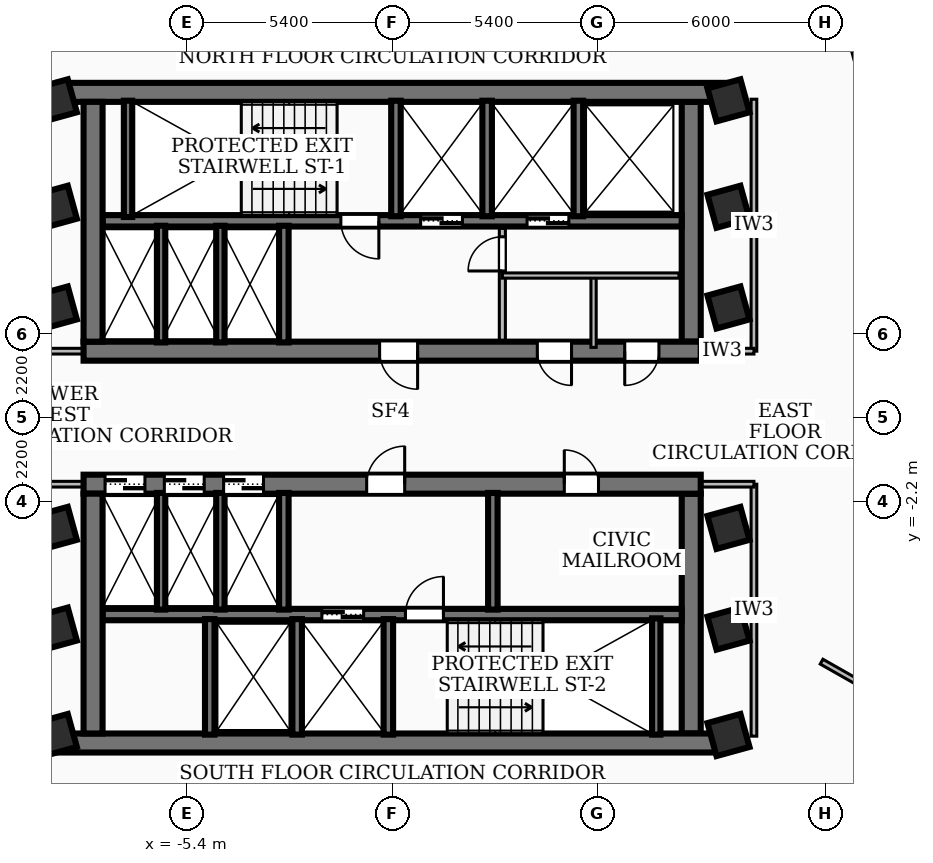
"""IFC4 building model, lengths in metres.
Left out: names, types, materials, properties, quantities, classifications, styles, units other than length and angle.
Written with IfcOpenShell. Run it as: python <this file> out.ifc"""

import sys

from ifc_helpers import new_model, si_unit, direction, frame, frame_2d, origin, origin_2d, place, context, subcontext, project, spatial, rectangle, extrude, element, fill, save


model = new_model("IFC4")
c1 = context("Model", 3, precision=1e-05, world=origin(), true_north=direction((0.0, 1.0)))
c2 = subcontext(c1, "Body", "Model", "MODEL_VIEW")
j1 = project(units=[si_unit("LENGTHUNIT", "METRE"), si_unit("PLANEANGLEUNIT", "RADIAN")], contexts=[c1])
p1 = place(None, origin())
s1 = spatial("IfcSite", under=j1, at=p1, CompositionType="ELEMENT")
p2 = place(p1, origin())
s2 = spatial("IfcBuilding", under=s1, at=p2, CompositionType="ELEMENT")
p3 = place(p2, frame((0.0, 0.0, 137.88)))
s3 = spatial("IfcBuildingStorey", under=s2, at=p3, CompositionType="ELEMENT", Elevation=137.88)
p4 = place(p3, frame((-8.78, 8.56, 0.0), z_axis=(0.0, 0.0, 1.0), x_axis=(1.0, 0.0, 0.0)))
e1 = element("IfcWall", 1, at=p4, inside=s3, PredefinedType="SHEAR", context=c2, shape_type="SweptSolid", body=[
    extrude(rectangle(XDim=17.56, YDim=0.5, at=frame_2d((8.78, 0.0))), origin(), (0.0, 0.0, 1.0), 3.32),
])
p5 = place(p3, frame((8.12, 1.75, 0.0), z_axis=(0.0, 0.0, 1.0), x_axis=(-1.0, 0.0, 0.0)))
e2 = element("IfcWall", 2, at=p5, inside=s3, PredefinedType="SHEAR", context=c2, shape_type="SweptSolid", body=[
    extrude(rectangle(XDim=16.24, YDim=0.5, at=frame_2d((8.12, 0.0))), origin(), (0.0, 0.0, 1.0), 3.32),
])
p6 = place(p5, frame((7.45, 0.0, 0.0)))
e3 = element("IfcOpeningElement", 3, at=p6, cuts=e2, PredefinedType="OPENING", context=c2, shape_type="SweptSolid", body=[
    extrude(rectangle(XDim=1.0, YDim=2.1, at=frame_2d((0.5, 1.05))), frame((0.0, 0.26, 0.0), z_axis=(0.0, -1.0, 0.0), x_axis=(1.0, 0.0, 0.0)), (0.0, 0.0, 1.0), 0.52),
])
p7 = place(p5, frame((3.4, 0.0, 0.0)))
e4 = element("IfcOpeningElement", 4, at=p7, cuts=e2, PredefinedType="OPENING", context=c2, shape_type="SweptSolid", body=[
    extrude(rectangle(XDim=0.9, YDim=2.06, at=frame_2d((0.45, 1.03))), frame((0.0, 0.26, 0.0), z_axis=(0.0, -1.0, 0.0), x_axis=(1.0, 0.0, 0.0)), (0.0, 0.0, 1.0), 0.52),
])
p8 = place(p5, frame((1.1, 0.0, 0.0)))
e5 = element("IfcOpeningElement", 5, at=p8, cuts=e2, PredefinedType="OPENING", context=c2, shape_type="SweptSolid", body=[
    extrude(rectangle(XDim=0.9, YDim=2.06, at=frame_2d((0.45, 1.03))), frame((0.0, 0.26, 0.0), z_axis=(0.0, -1.0, 0.0), x_axis=(1.0, 0.0, 0.0)), (0.0, 0.0, 1.0), 0.52),
])
for number, where, z_axis, x_axis in (
    (6, (-7.87, 2.0, 0.0), (0.0, 0.0, 1.0), (0.0, 1.0, 0.0)),
    (7, (7.87, 8.31, 0.0), (0.0, 0.0, 1.0), (0.0, -1.0, 0.0)),
):
    element("IfcWall", number, at=place(p3, frame(where, z_axis=z_axis, x_axis=x_axis)), inside=s3, PredefinedType="SHEAR", context=c2, shape_type="SweptSolid", body=[
        extrude(rectangle(XDim=6.31, YDim=0.5, at=frame_2d((3.155, 0.0))), origin(), (0.0, 0.0, 1.0), 3.32),
    ])
p9 = place(p3, frame((7.62, 5.18, 0.0), z_axis=(0.0, 0.0, 1.0), x_axis=(-1.0, 0.0, 0.0)))
e8 = element("IfcWall", 8, at=p9, inside=s3, PredefinedType="SOLIDWALL", context=c2, shape_type="SweptSolid", body=[
    extrude(rectangle(XDim=15.24, YDim=0.3, at=frame_2d((7.62, 0.0))), origin(), (0.0, 0.0, 1.0), 3.32),
])
p10 = place(p9, frame((5.77, 0.0, 0.0)))
e9 = element("IfcOpeningElement", 9, at=p10, cuts=e8, PredefinedType="OPENING", context=c2, shape_type="SweptSolid", body=[
    extrude(rectangle(XDim=1.1, YDim=2.15, at=frame_2d((0.55, 1.075))), frame((0.0, 0.16, 0.0), z_axis=(0.0, -1.0, 0.0), x_axis=(1.0, 0.0, 0.0)), (0.0, 0.0, 1.0), 0.32),
])
p11 = place(p9, frame((2.97, 0.0, 0.0)))
e10 = element("IfcOpeningElement", 10, at=p11, cuts=e8, PredefinedType="OPENING", context=c2, shape_type="SweptSolid", body=[
    extrude(rectangle(XDim=1.1, YDim=2.15, at=frame_2d((0.55, 1.075))), frame((0.0, 0.16, 0.0), z_axis=(0.0, -1.0, 0.0), x_axis=(1.0, 0.0, 0.0)), (0.0, 0.0, 1.0), 0.32),
])
p12 = place(p9, frame((7.97, 0.0, 0.0)))
e11 = element("IfcOpeningElement", 11, at=p12, cuts=e8, PredefinedType="OPENING", context=c2, shape_type="SweptSolid", body=[
    extrude(rectangle(XDim=1.0, YDim=2.1, at=frame_2d((0.5, 1.05))), frame((0.0, 0.16, 0.0), z_axis=(0.0, -1.0, 0.0), x_axis=(1.0, 0.0, 0.0)), (0.0, 0.0, 1.0), 0.32),
])
p13 = place(p3, frame((8.78, -8.56, 0.0), z_axis=(0.0, 0.0, 1.0), x_axis=(-1.0, 0.0, 0.0)))
e12 = element("IfcWall", 12, at=p13, inside=s3, PredefinedType="SHEAR", context=c2, shape_type="SweptSolid", body=[
    extrude(rectangle(XDim=17.56, YDim=0.5, at=frame_2d((8.78, 0.0))), origin(), (0.0, 0.0, 1.0), 3.32),
])
p14 = place(p3, frame((-8.12, -1.75, 0.0), z_axis=(0.0, 0.0, 1.0), x_axis=(1.0, 0.0, 0.0)))
e13 = element("IfcWall", 13, at=p14, inside=s3, PredefinedType="SHEAR", context=c2, shape_type="SweptSolid", body=[
    extrude(rectangle(XDim=16.24, YDim=0.5, at=frame_2d((8.12, 0.0))), origin(), (0.0, 0.0, 1.0), 3.32),
])
p15 = place(p14, frame((7.45, 0.0, 0.0)))
e14 = element("IfcOpeningElement", 14, at=p15, cuts=e13, PredefinedType="OPENING", context=c2, shape_type="SweptSolid", body=[
    extrude(rectangle(XDim=1.0, YDim=2.1, at=frame_2d((0.5, 1.05))), frame((0.0, 0.26, 0.0), z_axis=(0.0, -1.0, 0.0), x_axis=(1.0, 0.0, 0.0)), (0.0, 0.0, 1.0), 0.52),
])
p16 = place(p14, frame((12.65, 0.0, 0.0)))
e15 = element("IfcOpeningElement", 15, at=p16, cuts=e13, PredefinedType="OPENING", context=c2, shape_type="SweptSolid", body=[
    extrude(rectangle(XDim=0.9, YDim=2.06, at=frame_2d((0.45, 1.03))), frame((0.0, 0.26, 0.0), z_axis=(0.0, -1.0, 0.0), x_axis=(1.0, 0.0, 0.0)), (0.0, 0.0, 1.0), 0.52),
])
p17 = place(p14, frame((0.565, 0.0, 0.0)))
e16 = element("IfcOpeningElement", 16, at=p17, cuts=e13, PredefinedType="OPENING", context=c2, shape_type="SweptSolid", body=[
    extrude(rectangle(XDim=1.05, YDim=2.15, at=frame_2d((0.525, 1.075))), frame((0.0, 0.26, 0.0), z_axis=(0.0, -1.0, 0.0), x_axis=(1.0, 0.0, 0.0)), (0.0, 0.0, 1.0), 0.52),
])
p18 = place(p14, frame((2.125, 0.0, 0.0)))
e17 = element("IfcOpeningElement", 17, at=p18, cuts=e13, PredefinedType="OPENING", context=c2, shape_type="SweptSolid", body=[
    extrude(rectangle(XDim=1.05, YDim=2.15, at=frame_2d((0.525, 1.075))), frame((0.0, 0.26, 0.0), z_axis=(0.0, -1.0, 0.0), x_axis=(1.0, 0.0, 0.0)), (0.0, 0.0, 1.0), 0.52),
])
p19 = place(p14, frame((3.685, 0.0, 0.0)))
e18 = element("IfcOpeningElement", 18, at=p19, cuts=e13, PredefinedType="OPENING", context=c2, shape_type="SweptSolid", body=[
    extrude(rectangle(XDim=1.05, YDim=2.15, at=frame_2d((0.525, 1.075))), frame((0.0, 0.26, 0.0), z_axis=(0.0, -1.0, 0.0), x_axis=(1.0, 0.0, 0.0)), (0.0, 0.0, 1.0), 0.52),
])
for number, where, z_axis, x_axis in (
    (19, (-7.87, -8.31, 0.0), (0.0, 0.0, 1.0), (0.0, 1.0, 0.0)),
    (20, (7.87, -2.0, 0.0), (0.0, 0.0, 1.0), (0.0, -1.0, 0.0)),
):
    element("IfcWall", number, at=place(p3, frame(where, z_axis=z_axis, x_axis=x_axis)), inside=s3, PredefinedType="SHEAR", context=c2, shape_type="SweptSolid", body=[
        extrude(rectangle(XDim=6.31, YDim=0.5, at=frame_2d((3.155, 0.0))), origin(), (0.0, 0.0, 1.0), 3.32),
    ])
p20 = place(p3, frame((-7.62, -5.18, 0.0), z_axis=(0.0, 0.0, 1.0), x_axis=(1.0, 0.0, 0.0)))
e21 = element("IfcWall", 21, at=p20, inside=s3, PredefinedType="SOLIDWALL", context=c2, shape_type="SweptSolid", body=[
    extrude(rectangle(XDim=15.24, YDim=0.3, at=frame_2d((7.62, 0.0))), origin(), (0.0, 0.0, 1.0), 3.32),
])
p21 = place(p20, frame((5.77, 0.0, 0.0)))
e22 = element("IfcOpeningElement", 22, at=p21, cuts=e21, PredefinedType="OPENING", context=c2, shape_type="SweptSolid", body=[
    extrude(rectangle(XDim=1.1, YDim=2.15, at=frame_2d((0.55, 1.075))), frame((0.0, 0.16, 0.0), z_axis=(0.0, -1.0, 0.0), x_axis=(1.0, 0.0, 0.0)), (0.0, 0.0, 1.0), 0.32),
])
p22 = place(p20, frame((7.97, 0.0, 0.0)))
e23 = element("IfcOpeningElement", 23, at=p22, cuts=e21, PredefinedType="OPENING", context=c2, shape_type="SweptSolid", body=[
    extrude(rectangle(XDim=1.0, YDim=2.1, at=frame_2d((0.5, 1.05))), frame((0.0, 0.16, 0.0), z_axis=(0.0, -1.0, 0.0), x_axis=(1.0, 0.0, 0.0)), (0.0, 0.0, 1.0), 0.32),
])
for number, where, z_axis, x_axis in (
    (24, (-6.95, 5.28, 0.0), (0.0, 0.0, 1.0), (0.0, 1.0, 0.0)),
    (25, (6.95, -8.34, 0.0), (0.0, 0.0, 1.0), (0.0, 1.0, 0.0)),
):
    element("IfcWall", number, at=place(p3, frame(where, z_axis=z_axis, x_axis=x_axis)), inside=s3, PredefinedType="SOLIDWALL", context=c2, shape_type="SweptSolid", body=[
        extrude(rectangle(XDim=3.06, YDim=0.22, at=frame_2d((1.53, 0.0))), origin(), (0.0, 0.0, 1.0), 3.32),
    ])
for number, where, z_axis, x_axis in (
    (26, (0.1, 5.3, 0.0), (0.0, 0.0, 1.0), (0.0, 1.0, 0.0)),
    (27, (2.5, 5.3, 0.0), (0.0, 0.0, 1.0), (0.0, 1.0, 0.0)),
    (28, (4.9, 5.3, 0.0), (0.0, 0.0, 1.0), (0.0, 1.0, 0.0)),
):
    element("IfcWall", number, at=place(p3, frame(where, z_axis=z_axis, x_axis=x_axis)), inside=s3, PredefinedType="SOLIDWALL", context=c2, shape_type="SweptSolid", body=[
        extrude(rectangle(XDim=3.04, YDim=0.25, at=frame_2d((1.52, 0.0))), origin(), (0.0, 0.0, 1.0), 3.32),
    ])
p23 = place(p3, frame((-2.85, 1.98, 0.0), z_axis=(0.0, 0.0, 1.0), x_axis=(0.0, 1.0, 0.0)))
e29 = element("IfcWall", 29, at=p23, inside=s3, PredefinedType="SOLIDWALL", context=c2, shape_type="SweptSolid", body=[
    extrude(rectangle(XDim=3.07, YDim=0.25, at=frame_2d((1.535, 0.0))), origin(), (0.0, 0.0, 1.0), 3.32),
])
for number, where, z_axis, x_axis in (
    (30, (-0.1, -8.34, 0.0), (0.0, 0.0, 1.0), (0.0, 1.0, 0.0)),
    (31, (-2.5, -8.34, 0.0), (0.0, 0.0, 1.0), (0.0, 1.0, 0.0)),
    (32, (-4.8, -8.34, 0.0), (0.0, 0.0, 1.0), (0.0, 1.0, 0.0)),
):
    element("IfcWall", number, at=place(p3, frame(where, z_axis=z_axis, x_axis=x_axis)), inside=s3, PredefinedType="SOLIDWALL", context=c2, shape_type="SweptSolid", body=[
        extrude(rectangle(XDim=3.04, YDim=0.25, at=frame_2d((1.52, 0.0))), origin(), (0.0, 0.0, 1.0), 3.32),
    ])
for number, where, z_axis, x_axis in (
    (33, (-2.85, -5.05, 0.0), (0.0, 0.0, 1.0), (0.0, 1.0, 0.0)),
    (34, (2.65, -5.05, 0.0), (0.0, 0.0, 1.0), (0.0, 1.0, 0.0)),
):
    element("IfcWall", number, at=place(p3, frame(where, z_axis=z_axis, x_axis=x_axis)), inside=s3, PredefinedType="SOLIDWALL", context=c2, shape_type="SweptSolid", body=[
        extrude(rectangle(XDim=3.07, YDim=0.25, at=frame_2d((1.535, 0.0))), origin(), (0.0, 0.0, 1.0), 3.32),
    ])
for number, where, z_axis, x_axis in (
    (35, (-6.08, 1.98, 0.0), (0.0, 0.0, 1.0), (0.0, 1.0, 0.0)),
    (36, (-4.52, 1.98, 0.0), (0.0, 0.0, 1.0), (0.0, 1.0, 0.0)),
    (37, (-6.08, -5.05, 0.0), (0.0, 0.0, 1.0), (0.0, 1.0, 0.0)),
    (38, (-4.52, -5.05, 0.0), (0.0, 0.0, 1.0), (0.0, 1.0, 0.0)),
):
    element("IfcWall", number, at=place(p3, frame(where, z_axis=z_axis, x_axis=x_axis)), inside=s3, PredefinedType="SOLIDWALL", context=c2, shape_type="SweptSolid", body=[
        extrude(rectangle(XDim=3.07, YDim=0.22, at=frame_2d((1.535, 0.0))), origin(), (0.0, 0.0, 1.0), 3.32),
    ])
for number, where, z_axis, x_axis in (
    (39, (-8.85, -5.55, 0.0), (0.0, 0.0, 1.0), (0.964, 0.266, 0.0)),
    (40, (-8.85, -2.9, 0.0), (0.0, 0.0, 1.0), (0.964, 0.266, 0.0)),
    (41, (-8.85, 2.9, 0.0), (0.0, 0.0, 1.0), (0.964, 0.266, 0.0)),
    (42, (-8.85, 5.55, 0.0), (0.0, 0.0, 1.0), (0.964, 0.266, 0.0)),
    (43, (8.85, -5.55, 0.0), (0.0, 0.0, 1.0), (0.964, 0.266, 0.0)),
    (44, (8.85, -2.9, 0.0), (0.0, 0.0, 1.0), (0.964, 0.266, 0.0)),
    (45, (8.85, 2.9, 0.0), (0.0, 0.0, 1.0), (0.964, 0.266, 0.0)),
    (46, (8.85, 5.55, 0.0), (0.0, 0.0, 1.0), (0.964, 0.266, 0.0)),
    (47, (-8.85, 8.35, 0.0), (0.0, 0.0, 1.0), (0.964, 0.266, 0.0)),
    (48, (8.85, -8.35, 0.0), (0.0, 0.0, 1.0), (0.964, 0.266, 0.0)),
    (49, (8.85, 8.35, 0.0), (0.0, 0.0, 1.0), (0.964, 0.266, 0.0)),
    (50, (-8.85, -8.35, 0.0), (0.0, 0.0, 1.0), (0.964, 0.266, 0.0)),
):
    element("IfcColumn", number, at=place(p3, frame(where, z_axis=z_axis, x_axis=x_axis)), inside=s3, PredefinedType="COLUMN", context=c2, shape_type="SweptSolid", body=[
        extrude(rectangle(XDim=0.9, YDim=0.9, at=origin_2d()), origin(), (0.0, 0.0, 1.0), 3.6),
    ])
p24 = place(p3, frame((2.9, 2.04, 0.0), z_axis=(0.0, 0.0, 1.0), x_axis=(0.0, 1.0, 0.0)))
e51 = element("IfcWall", 51, at=p24, inside=s3, PredefinedType="PARTITIONING", context=c2, shape_type="SweptSolid", body=[
    extrude(rectangle(XDim=2.94, YDim=0.16, at=frame_2d((1.47, 0.0))), origin(), (0.0, 0.0, 1.0), 2.55),
])
p25 = place(p24, frame((1.82, 0.0, 0.0)))
e52 = element("IfcOpeningElement", 52, at=p25, cuts=e51, PredefinedType="OPENING", context=c2, shape_type="SweptSolid", body=[
    extrude(rectangle(XDim=0.9, YDim=2.06, at=frame_2d((0.45, 1.03))), frame((0.0, 0.09, 0.0), z_axis=(0.0, -1.0, 0.0), x_axis=(1.0, 0.0, 0.0)), (0.0, 0.0, 1.0), 0.18),
])
p26 = place(p3, frame((2.9, 3.74, 0.0), z_axis=(0.0, 0.0, 1.0), x_axis=(1.0, 0.0, 0.0)))
e53 = element("IfcWall", 53, at=p26, inside=s3, PredefinedType="PARTITIONING", context=c2, shape_type="SweptSolid", body=[
    extrude(rectangle(XDim=4.65, YDim=0.138, at=frame_2d((2.325, 0.0))), origin(), (0.0, 0.0, 1.0), 3.32),
])
p27 = place(p3, frame((5.3, 1.85, 0.0), z_axis=(0.0, 0.0, 1.0), x_axis=(0.0, 1.0, 0.0)))
e54 = element("IfcWall", 54, at=p27, inside=s3, PredefinedType="PARTITIONING", context=c2, shape_type="SweptSolid", body=[
    extrude(rectangle(XDim=1.89, YDim=0.138, at=frame_2d((0.945, 0.0))), origin(), (0.0, 0.0, 1.0), 2.55),
])
for number, where, z_axis, x_axis in (
    (55, (-7.85, 1.75, 0.0), (0.0, 0.0, 1.0), (-1.0, 0.0, 0.0)),
    (56, (-7.85, -1.75, 0.0), (0.0, 0.0, 1.0), (-1.0, 0.0, 0.0)),
):
    element("IfcWall", number, at=place(p3, frame(where, z_axis=z_axis, x_axis=x_axis)), inside=s3, PredefinedType="PARTITIONING", context=c2, shape_type="SweptSolid", body=[
        extrude(rectangle(XDim=1.67, YDim=0.15, at=frame_2d((0.835, 0.0))), origin(), (0.0, 0.0, 1.0), 2.55),
    ])
p28 = place(p3, frame((9.52, 1.75, 0.0), z_axis=(0.0, 0.0, 1.0), x_axis=(0.0, 1.0, 0.0)))
e57 = element("IfcWall", 57, at=p28, inside=s3, PredefinedType="PARTITIONING", context=c2, shape_type="SweptSolid", body=[
    extrude(rectangle(XDim=6.63, YDim=0.15, at=frame_2d((3.315, 0.0))), origin(), (0.0, 0.0, 1.0), 2.55),
])
p29 = place(p3, frame((7.85, 1.75, 0.0), z_axis=(0.0, 0.0, 1.0), x_axis=(1.0, 0.0, 0.0)))
e58 = element("IfcWall", 58, at=p29, inside=s3, PredefinedType="PARTITIONING", context=c2, shape_type="SweptSolid", body=[
    extrude(rectangle(XDim=1.67, YDim=0.15, at=frame_2d((0.835, 0.0))), origin(), (0.0, 0.0, 1.0), 2.55),
])
p30 = place(p3, frame((9.52, -8.38, 0.0), z_axis=(0.0, 0.0, 1.0), x_axis=(0.0, 1.0, 0.0)))
e59 = element("IfcWall", 59, at=p30, inside=s3, PredefinedType="PARTITIONING", context=c2, shape_type="SweptSolid", body=[
    extrude(rectangle(XDim=6.63, YDim=0.15, at=frame_2d((3.315, 0.0))), origin(), (0.0, 0.0, 1.0), 2.55),
])
p31 = place(p3, frame((7.85, -1.75, 0.0), z_axis=(0.0, 0.0, 1.0), x_axis=(1.0, 0.0, 0.0)))
e60 = element("IfcWall", 60, at=p31, inside=s3, PredefinedType="PARTITIONING", context=c2, shape_type="SweptSolid", body=[
    extrude(rectangle(XDim=1.67, YDim=0.15, at=frame_2d((0.835, 0.0))), origin(), (0.0, 0.0, 1.0), 2.55),
])
p32 = place(p3, frame((11.3, -6.419, 0.0), z_axis=(0.0, 0.0, 1.0), x_axis=(0.869475469758, -0.493976120363, 0.0)))
e61 = element("IfcWall", 61, at=p32, inside=s3, PredefinedType="PARTITIONING", context=c2, shape_type="SweptSolid", body=[
    extrude(rectangle(XDim=6.679, YDim=0.145, at=frame_2d((3.339, 0.0))), origin(), (0.0, 0.0, 1.0), 3.32),
])
p33 = place(p3, frame((10.999, 13.879, 0.0), z_axis=(0.0, 0.0, 1.0), x_axis=(0.26558288107, -0.964088031915, 0.0)))
e62 = element("IfcWall", 62, at=p33, inside=s3, PredefinedType="PARTITIONING", context=c2, shape_type="SweptSolid", body=[
    extrude(rectangle(XDim=20.479, YDim=0.145, at=frame_2d((10.24, 0.0))), origin(), (0.0, 0.0, 1.0), 2.55),
])
p34 = place(p33, frame((9.86, 0.0, 0.0)))
e63 = element("IfcOpeningElement", 63, at=p34, cuts=e62, PredefinedType="OPENING", context=c2, shape_type="SweptSolid", body=[
    extrude(rectangle(XDim=1.2, YDim=2.1, at=frame_2d((0.6, 1.05))), frame((0.0, 0.083, 0.0), z_axis=(0.0, -1.0, 0.0), x_axis=(1.0, 0.0, 0.0)), (0.0, 0.0, 1.0), 0.165),
])
p35 = place(p6, origin())
e64 = element("IfcDoor", 64, at=p35, inside=s3, OperationType="SINGLE_SWING_LEFT", PredefinedType="DOOR", context=c2, shape_type="SweptSolid", body=[
    extrude(rectangle(XDim=1.0, YDim=2.1, at=frame_2d((0.5, 1.05))), frame((0.0, 0.025, 0.0), z_axis=(0.0, -1.0, 0.0), x_axis=(1.0, 0.0, 0.0)), (0.0, 0.0, 1.0), 0.05),
])
fill(e3, e64)
p36 = place(p15, origin())
e65 = element("IfcDoor", 65, at=p36, inside=s3, OperationType="SINGLE_SWING_RIGHT", PredefinedType="DOOR", context=c2, shape_type="SweptSolid", body=[
    extrude(rectangle(XDim=1.0, YDim=2.1, at=frame_2d((0.5, 1.05))), frame((0.0, 0.025, 0.0), z_axis=(0.0, -1.0, 0.0), x_axis=(1.0, 0.0, 0.0)), (0.0, 0.0, 1.0), 0.05),
])
fill(e14, e65)
p37 = place(p10, origin())
e66 = element("IfcDoor", 66, at=p37, inside=s3, OperationType="DOUBLE_DOOR_SLIDING", PredefinedType="DOOR", context=c2, shape_type="SweptSolid", body=[
    extrude(rectangle(XDim=1.1, YDim=2.15, at=frame_2d((0.55, 1.075))), frame((0.0, 0.025, 0.0), z_axis=(0.0, -1.0, 0.0), x_axis=(1.0, 0.0, 0.0)), (0.0, 0.0, 1.0), 0.05),
])
fill(e9, e66)
p38 = place(p11, origin())
e67 = element("IfcDoor", 67, at=p38, inside=s3, OperationType="DOUBLE_DOOR_SLIDING", PredefinedType="DOOR", context=c2, shape_type="SweptSolid", body=[
    extrude(rectangle(XDim=1.1, YDim=2.15, at=frame_2d((0.55, 1.075))), frame((0.0, 0.025, 0.0), z_axis=(0.0, -1.0, 0.0), x_axis=(1.0, 0.0, 0.0)), (0.0, 0.0, 1.0), 0.05),
])
fill(e10, e67)
p39 = place(p12, origin())
e68 = element("IfcDoor", 68, at=p39, inside=s3, OperationType="SINGLE_SWING_LEFT", PredefinedType="DOOR", context=c2, shape_type="SweptSolid", body=[
    extrude(rectangle(XDim=1.0, YDim=2.1, at=frame_2d((0.5, 1.05))), frame((0.0, 0.025, 0.0), z_axis=(0.0, -1.0, 0.0), x_axis=(1.0, 0.0, 0.0)), (0.0, 0.0, 1.0), 0.05),
])
fill(e11, e68)
p40 = place(p21, origin())
e69 = element("IfcDoor", 69, at=p40, inside=s3, OperationType="DOUBLE_DOOR_SLIDING", PredefinedType="DOOR", context=c2, shape_type="SweptSolid", body=[
    extrude(rectangle(XDim=1.1, YDim=2.15, at=frame_2d((0.55, 1.075))), frame((0.0, 0.025, 0.0), z_axis=(0.0, -1.0, 0.0), x_axis=(1.0, 0.0, 0.0)), (0.0, 0.0, 1.0), 0.05),
])
fill(e22, e69)
p41 = place(p22, origin())
e70 = element("IfcDoor", 70, at=p41, inside=s3, OperationType="SINGLE_SWING_RIGHT", PredefinedType="DOOR", context=c2, shape_type="SweptSolid", body=[
    extrude(rectangle(XDim=1.0, YDim=2.1, at=frame_2d((0.5, 1.05))), frame((0.0, 0.025, 0.0), z_axis=(0.0, -1.0, 0.0), x_axis=(1.0, 0.0, 0.0)), (0.0, 0.0, 1.0), 0.05),
])
fill(e23, e70)
p42 = place(p16, origin())
e71 = element("IfcDoor", 71, at=p42, inside=s3, OperationType="SINGLE_SWING_LEFT", PredefinedType="DOOR", context=c2, shape_type="SweptSolid", body=[
    extrude(rectangle(XDim=0.9, YDim=2.06, at=frame_2d((0.45, 1.03))), frame((0.0, 0.025, 0.0), z_axis=(0.0, -1.0, 0.0), x_axis=(1.0, 0.0, 0.0)), (0.0, 0.0, 1.0), 0.05),
])
fill(e15, e71)
p43 = place(p17, origin())
e72 = element("IfcDoor", 72, at=p43, inside=s3, OperationType="DOUBLE_DOOR_SLIDING", PredefinedType="DOOR", context=c2, shape_type="SweptSolid", body=[
    extrude(rectangle(XDim=1.05, YDim=2.15, at=frame_2d((0.525, 1.075))), frame((0.0, 0.025, 0.0), z_axis=(0.0, -1.0, 0.0), x_axis=(1.0, 0.0, 0.0)), (0.0, 0.0, 1.0), 0.05),
])
fill(e16, e72)
p44 = place(p18, origin())
e73 = element("IfcDoor", 73, at=p44, inside=s3, OperationType="DOUBLE_DOOR_SLIDING", PredefinedType="DOOR", context=c2, shape_type="SweptSolid", body=[
    extrude(rectangle(XDim=1.05, YDim=2.15, at=frame_2d((0.525, 1.075))), frame((0.0, 0.025, 0.0), z_axis=(0.0, -1.0, 0.0), x_axis=(1.0, 0.0, 0.0)), (0.0, 0.0, 1.0), 0.05),
])
fill(e17, e73)
p45 = place(p19, origin())
e74 = element("IfcDoor", 74, at=p45, inside=s3, OperationType="DOUBLE_DOOR_SLIDING", PredefinedType="DOOR", context=c2, shape_type="SweptSolid", body=[
    extrude(rectangle(XDim=1.05, YDim=2.15, at=frame_2d((0.525, 1.075))), frame((0.0, 0.025, 0.0), z_axis=(0.0, -1.0, 0.0), x_axis=(1.0, 0.0, 0.0)), (0.0, 0.0, 1.0), 0.05),
])
fill(e18, e74)
p46 = place(p7, origin())
e75 = element("IfcDoor", 75, at=p46, inside=s3, OperationType="SINGLE_SWING_LEFT", PredefinedType="DOOR", context=c2, shape_type="SweptSolid", body=[
    extrude(rectangle(XDim=0.9, YDim=2.06, at=frame_2d((0.45, 1.03))), frame((0.0, 0.025, 0.0), z_axis=(0.0, -1.0, 0.0), x_axis=(1.0, 0.0, 0.0)), (0.0, 0.0, 1.0), 0.05),
])
fill(e4, e75)
p47 = place(p8, origin())
e76 = element("IfcDoor", 76, at=p47, inside=s3, OperationType="SINGLE_SWING_RIGHT", PredefinedType="DOOR", context=c2, shape_type="SweptSolid", body=[
    extrude(rectangle(XDim=0.9, YDim=2.06, at=frame_2d((0.45, 1.03))), frame((0.0, 0.025, 0.0), z_axis=(0.0, -1.0, 0.0), x_axis=(1.0, 0.0, 0.0)), (0.0, 0.0, 1.0), 0.05),
])
fill(e5, e76)
p48 = place(p25, origin())
e77 = element("IfcDoor", 77, at=p48, inside=s3, OperationType="SINGLE_SWING_LEFT", PredefinedType="DOOR", context=c2, shape_type="SweptSolid", body=[
    extrude(rectangle(XDim=0.9, YDim=2.06, at=frame_2d((0.45, 1.03))), frame((0.0, 0.025, 0.0), z_axis=(0.0, -1.0, 0.0), x_axis=(1.0, 0.0, 0.0)), (0.0, 0.0, 1.0), 0.05),
])
fill(e52, e77)
save(model, sys.argv[1])
